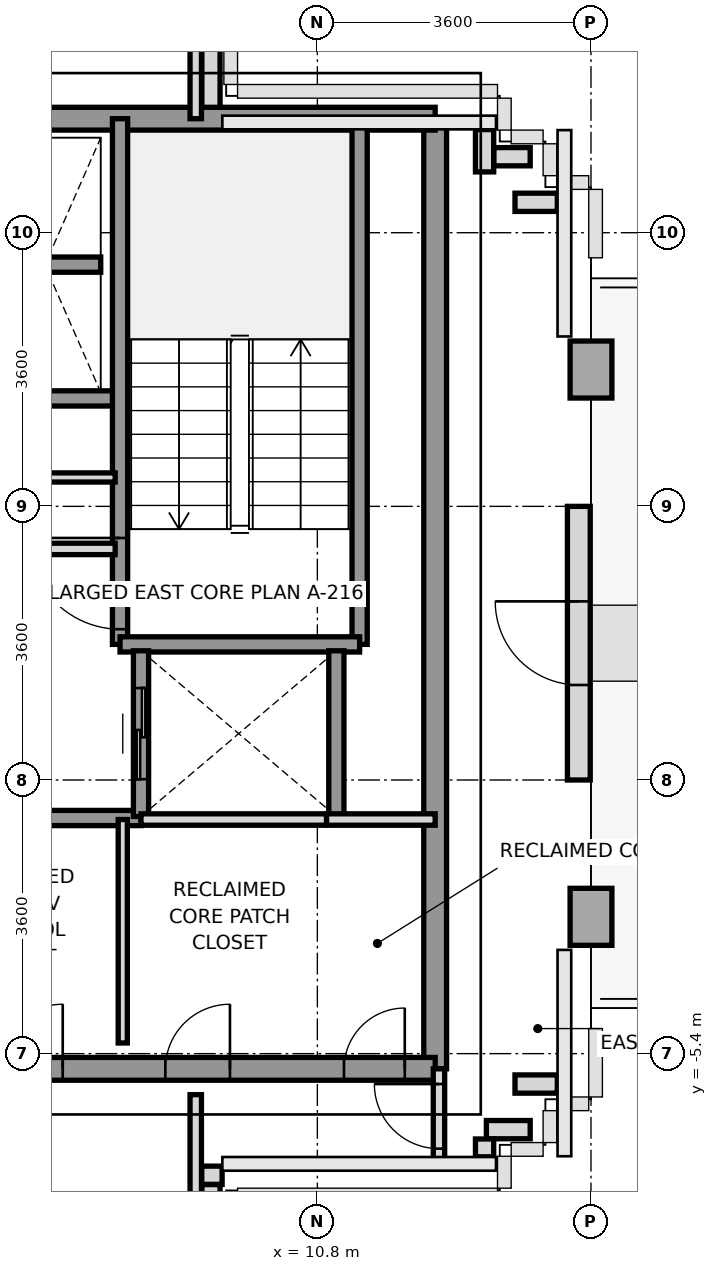
"""IFC4 building model, lengths in metres.
Left out: names, types, materials, properties, quantities, classifications, styles, units other than length and angle.
Written with IfcOpenShell. Run it as: python <this file> out.ifc"""

import sys

from ifc_helpers import new_model, si_unit, direction, frame, frame_2d, origin, origin_2d, place, context, subcontext, project, spatial, rectangle, extrude, source, transform, mapped, element, fill, save


model = new_model("IFC4")
c1 = context("Model", 3, precision=1e-05, world=origin(), true_north=direction((0.0, 1.0)))
c2 = subcontext(c1, "Body", "Model", "MODEL_VIEW")
j1 = project(units=[si_unit("LENGTHUNIT", "METRE"), si_unit("PLANEANGLEUNIT", "RADIAN")], contexts=[c1])
p1 = place(None, origin())
s1 = spatial("IfcSite", under=j1, at=p1, CompositionType="ELEMENT")
p2 = place(p1, origin())
s2 = spatial("IfcBuilding", under=s1, at=p2, CompositionType="ELEMENT")
p3 = place(p2, frame((0.0, 0.0, 258.8)))
s3 = spatial("IfcBuildingStorey", under=s2, at=p3, CompositionType="ELEMENT", Elevation=258.8)
m1 = source(origin(), c2, "Body", "SweptSolid", [
    extrude(rectangle(XDim=0.55, YDim=0.75, at=origin_2d()), origin(), (0.0, 0.0, 1.0), 3.01),
])
for number, where, z_axis, x_axis in (
    (1, (14.4, -3.6, 0.0), (0.0, 0.0, 1.0), (1.0, 0.0, 0.0)),
    (2, (14.4, 3.6, 0.0), (0.0, 0.0, 1.0), (1.0, 0.0, 0.0)),
):
    element("IfcColumn", number, at=place(p3, frame(where, z_axis=z_axis, x_axis=x_axis)), inside=s3, PredefinedType="COLUMN", context=c2, shape_type="MappedRepresentation", body=[
        mapped(m1, transform((0.0, 0.0, 0.0), x_axis=(1.0, 0.0, 0.0), y_axis=(0.0, 1.0, 0.0), z_axis=(0.0, 0.0, 1.0), scale=1.0)),
    ])
p4 = place(p3, frame((14.24, -1.8, 0.0), z_axis=(0.0, 0.0, 1.0), x_axis=(0.0, 1.0, 0.0)))
e3 = element("IfcWall", 3, at=p4, inside=s3, PredefinedType="SOLIDWALL", context=c2, shape_type="SweptSolid", body=[
    extrude(rectangle(XDim=3.6, YDim=0.3, at=frame_2d((1.8, 0.0))), origin(), (0.0, 0.0, 1.0), 2.36),
])
p5 = place(p4, frame((1.25, 0.0, 0.0)))
e4 = element("IfcOpeningElement", 4, at=p5, cuts=e3, PredefinedType="OPENING", context=c2, shape_type="SweptSolid", body=[
    extrude(rectangle(XDim=1.1, YDim=2.3, at=frame_2d((0.55, 1.15))), frame((0.0, 0.16, 0.0), z_axis=(0.0, -1.0, 0.0), x_axis=(1.0, 0.0, 0.0)), (0.0, 0.0, 1.0), 0.32),
])
p6 = place(p3, frame((13.957, -5.8, 0.0), z_axis=(0.0, 0.0, 1.0), x_axis=(-1.0, 0.0, 0.0)))
e5 = element("IfcWall", 5, at=p6, inside=s3, PredefinedType="PARAPET", context=c2, shape_type="SweptSolid", body=[
    extrude(rectangle(XDim=0.557, YDim=0.24, at=frame_2d((0.279, 0.0))), origin(), (0.0, 0.0, 1.0), 1.15),
])
p7 = place(p3, frame((13.6, -6.4, 0.0), z_axis=(0.0, 0.0, 1.0), x_axis=(-1.0, 0.0, 0.0)))
e6 = element("IfcWall", 6, at=p7, inside=s3, PredefinedType="PARAPET", context=c2, shape_type="SweptSolid", body=[
    extrude(rectangle(XDim=0.576, YDim=0.24, at=frame_2d((0.288, 0.0))), origin(), (0.0, 0.0, 1.0), 1.15),
])
p8 = place(p3, frame((13.0, -6.523, 0.0), z_axis=(0.0, 0.0, 1.0), x_axis=(0.0, -1.0, 0.0)))
e7 = element("IfcWall", 7, at=p8, inside=s3, PredefinedType="PARAPET", context=c2, shape_type="SweptSolid", body=[
    extrude(rectangle(XDim=0.234, YDim=0.24, at=frame_2d((0.117, 0.0))), origin(), (0.0, 0.0, 1.0), 1.15),
])
p9 = place(p3, frame((9.547, -7.0, 0.0), z_axis=(0.0, 0.0, 1.0), x_axis=(-1.0, 0.0, 0.0)))
e8 = element("IfcWall", 8, at=p9, inside=s3, PredefinedType="PARAPET", context=c2, shape_type="SweptSolid", body=[
    extrude(rectangle(XDim=0.269, YDim=0.24, at=frame_2d((0.135, 0.0))), origin(), (0.0, 0.0, 1.0), 1.15),
])
p10 = place(p3, frame((9.4, -7.123, 0.0), z_axis=(0.0, 0.0, 1.0), x_axis=(0.0, -1.0, 0.0)))
e9 = element("IfcWall", 9, at=p10, inside=s3, PredefinedType="PARAPET", context=c2, shape_type="SweptSolid", body=[
    extrude(rectangle(XDim=1.499, YDim=0.24, at=frame_2d((0.75, 0.0))), origin(), (0.0, 0.0, 1.0), 1.15),
])
p11 = place(p3, frame((9.4, 8.622, 0.0), z_axis=(0.0, 0.0, 1.0), x_axis=(0.0, -1.0, 0.0)))
e10 = element("IfcWall", 10, at=p11, inside=s3, PredefinedType="PARAPET", context=c2, shape_type="SweptSolid", body=[
    extrude(rectangle(XDim=1.669, YDim=0.24, at=frame_2d((0.834, 0.0))), origin(), (0.0, 0.0, 1.0), 1.15),
])
p12 = place(p3, frame((13.0, 6.757, 0.0), z_axis=(0.0, 0.0, 1.0), x_axis=(0.0, -1.0, 0.0)))
e11 = element("IfcWall", 11, at=p12, inside=s3, PredefinedType="PARAPET", context=c2, shape_type="SweptSolid", body=[
    extrude(rectangle(XDim=0.557, YDim=0.24, at=frame_2d((0.279, 0.0))), origin(), (0.0, 0.0, 1.0), 1.15),
])
p13 = place(p3, frame((13.123, 6.4, 0.0), z_axis=(0.0, 0.0, 1.0), x_axis=(1.0, 0.0, 0.0)))
e12 = element("IfcWall", 12, at=p13, inside=s3, PredefinedType="PARAPET", context=c2, shape_type="SweptSolid", body=[
    extrude(rectangle(XDim=0.477, YDim=0.24, at=frame_2d((0.239, 0.0))), origin(), (0.0, 0.0, 1.0), 1.15),
])
p14 = place(p3, frame((13.4, 5.8, 0.0), z_axis=(0.0, 0.0, 1.0), x_axis=(1.0, 0.0, 0.0)))
e13 = element("IfcWall", 13, at=p14, inside=s3, PredefinedType="PARAPET", context=c2, shape_type="SweptSolid", body=[
    extrude(rectangle(XDim=0.557, YDim=0.24, at=frame_2d((0.279, 0.0))), origin(), (0.0, 0.0, 1.0), 1.15),
])
p15 = place(p3, frame((12.35, -5.6, 0.0), z_axis=(0.0, 0.0, 1.0), x_axis=(0.0, 1.0, 0.0)))
e14 = element("IfcWall", 14, at=p15, inside=s3, PredefinedType="SHEAR", context=c2, shape_type="SweptSolid", body=[
    extrude(rectangle(XDim=12.5, YDim=0.3, at=frame_2d((6.25, 0.0))), origin(), (0.0, 0.0, 1.0), 3.01),
])
p16 = place(p3, frame((5.4, 6.9, 0.0), z_axis=(0.0, 0.0, 1.0), x_axis=(1.0, 0.0, 0.0)))
e15 = element("IfcWall", 15, at=p16, inside=s3, PredefinedType="SHEAR", context=c2, shape_type="SweptSolid", body=[
    extrude(rectangle(XDim=6.95, YDim=0.3, at=frame_2d((3.475, 0.0))), origin(), (0.0, 0.0, 1.0), 3.01),
])
p17 = place(p3, frame((5.4, -5.6, 0.0), z_axis=(0.0, 0.0, 1.0), x_axis=(1.0, 0.0, 0.0)))
e16 = element("IfcWall", 16, at=p17, inside=s3, PredefinedType="SHEAR", context=c2, shape_type="SweptSolid", body=[
    extrude(rectangle(XDim=6.95, YDim=0.3, at=frame_2d((3.475, 0.0))), origin(), (0.0, 0.0, 1.0), 3.01),
])
p18 = place(p17, frame((5.75, 0.0, 0.0)))
e17 = element("IfcOpeningElement", 17, at=p18, cuts=e16, PredefinedType="OPENING", context=c2, shape_type="SweptSolid", body=[
    extrude(rectangle(XDim=0.8, YDim=2.1, at=frame_2d((0.4, 1.05))), frame((0.0, 0.16, 0.0), z_axis=(0.0, -1.0, 0.0), x_axis=(1.0, 0.0, 0.0)), (0.0, 0.0, 1.0), 0.32),
])
p19 = place(p17, frame((1.2, 0.0, 0.0)))
e18 = element("IfcOpeningElement", 18, at=p19, cuts=e16, PredefinedType="OPENING", context=c2, shape_type="SweptSolid", body=[
    extrude(rectangle(XDim=0.85, YDim=2.1, at=frame_2d((0.425, 1.05))), frame((0.0, 0.16, 0.0), z_axis=(0.0, -1.0, 0.0), x_axis=(1.0, 0.0, 0.0)), (0.0, 0.0, 1.0), 0.32),
])
p20 = place(p17, frame((3.4, 0.0, 0.0)))
e19 = element("IfcOpeningElement", 19, at=p20, cuts=e16, PredefinedType="OPENING", context=c2, shape_type="SweptSolid", body=[
    extrude(rectangle(XDim=0.85, YDim=2.1, at=frame_2d((0.425, 1.05))), frame((0.0, 0.16, 0.0), z_axis=(0.0, -1.0, 0.0), x_axis=(1.0, 0.0, 0.0)), (0.0, 0.0, 1.0), 0.32),
])
p21 = place(p3, frame((5.4, 3.22, 0.0), z_axis=(0.0, 0.0, 1.0), x_axis=(1.0, 0.0, 0.0)))
e20 = element("IfcWall", 20, at=p21, inside=s3, PredefinedType="SOLIDWALL", context=c2, shape_type="SweptSolid", body=[
    extrude(rectangle(XDim=2.78, YDim=0.2, at=frame_2d((1.39, 0.0))), origin(), (0.0, 0.0, 1.0), 3.01),
])
p22 = place(p3, frame((5.4, -2.3, 0.0), z_axis=(0.0, 0.0, 1.0), x_axis=(1.0, 0.0, 0.0)))
e21 = element("IfcWall", 21, at=p22, inside=s3, PredefinedType="SOLIDWALL", context=c2, shape_type="SweptSolid", body=[
    extrude(rectangle(XDim=3.08, YDim=0.2, at=frame_2d((1.54, 0.0))), origin(), (0.0, 0.0, 1.0), 3.01),
])
p23 = place(p3, frame((8.204, -0.016, 0.0), z_axis=(0.0, 0.0, 1.0), x_axis=(0.0, 1.0, 0.0)))
e22 = element("IfcWall", 22, at=p23, inside=s3, PredefinedType="SOLIDWALL", context=c2, shape_type="SweptSolid", body=[
    extrude(rectangle(XDim=6.916, YDim=0.2, at=frame_2d((3.458, 0.0))), origin(), (0.0, 0.0, 1.0), 3.01),
])
p24 = place(p23, frame((0.2, 0.0, 0.0)))
e23 = element("IfcOpeningElement", 23, at=p24, cuts=e22, PredefinedType="OPENING", context=c2, shape_type="SweptSolid", body=[
    extrude(rectangle(XDim=1.2, YDim=2.2, at=frame_2d((0.6, 1.1))), frame((0.0, 0.11, 0.0), z_axis=(0.0, -1.0, 0.0), x_axis=(1.0, 0.0, 0.0)), (0.0, 0.0, 1.0), 0.22),
])
p25 = place(p3, frame((11.356, -0.016, 0.0), z_axis=(0.0, 0.0, 1.0), x_axis=(0.0, 1.0, 0.0)))
e24 = element("IfcWall", 24, at=p25, inside=s3, PredefinedType="SOLIDWALL", context=c2, shape_type="SweptSolid", body=[
    extrude(rectangle(XDim=6.916, YDim=0.2, at=frame_2d((3.458, 0.0))), origin(), (0.0, 0.0, 1.0), 3.01),
])
p26 = place(p3, frame((8.204, -0.016, 0.0), z_axis=(0.0, 0.0, 1.0), x_axis=(1.0, 0.0, 0.0)))
e25 = element("IfcWall", 25, at=p26, inside=s3, PredefinedType="SOLIDWALL", context=c2, shape_type="SweptSolid", body=[
    extrude(rectangle(XDim=3.152, YDim=0.2, at=frame_2d((1.576, 0.0))), origin(), (0.0, 0.0, 1.0), 3.01),
])
p27 = place(p3, frame((8.48, -2.28, 0.0), z_axis=(0.0, 0.0, 1.0), x_axis=(0.0, 1.0, 0.0)))
e26 = element("IfcWall", 26, at=p27, inside=s3, PredefinedType="SOLIDWALL", context=c2, shape_type="SweptSolid", body=[
    extrude(rectangle(XDim=2.18, YDim=0.2, at=frame_2d((1.09, 0.0))), origin(), (0.0, 0.0, 1.0), 3.01),
])
p28 = place(p27, frame((0.49, 0.0, 0.0)))
e27 = element("IfcOpeningElement", 27, at=p28, cuts=e26, PredefinedType="OPENING", context=c2, shape_type="SweptSolid", body=[
    extrude(rectangle(XDim=1.2, YDim=2.2, at=frame_2d((0.6, 1.1))), frame((0.0, 0.11, 0.0), z_axis=(0.0, -1.0, 0.0), x_axis=(1.0, 0.0, 0.0)), (0.0, 0.0, 1.0), 0.22),
])
p29 = place(p3, frame((11.05, -2.28, 0.0), z_axis=(0.0, 0.0, 1.0), x_axis=(0.0, 1.0, 0.0)))
e28 = element("IfcWall", 28, at=p29, inside=s3, PredefinedType="SOLIDWALL", context=c2, shape_type="SweptSolid", body=[
    extrude(rectangle(XDim=2.18, YDim=0.2, at=frame_2d((1.09, 0.0))), origin(), (0.0, 0.0, 1.0), 3.01),
])
p30 = place(p3, frame((6.48, 4.98, 0.0), z_axis=(0.0, 0.0, 1.0), x_axis=(1.0, 0.0, 0.0)))
e29 = element("IfcWall", 29, at=p30, inside=s3, PredefinedType="SOLIDWALL", context=c2, shape_type="SweptSolid", body=[
    extrude(rectangle(XDim=1.47, YDim=0.2, at=frame_2d((0.735, 0.0))), origin(), (0.0, 0.0, 1.0), 3.01),
])
p31 = place(p3, frame((5.75, 1.24, 0.0), z_axis=(0.0, 0.0, 1.0), x_axis=(1.0, 0.0, 0.0)))
e30 = element("IfcWall", 30, at=p31, inside=s3, PredefinedType="PARTITIONING", context=c2, shape_type="SweptSolid", body=[
    extrude(rectangle(XDim=2.39, YDim=0.15, at=frame_2d((1.195, 0.0))), origin(), (0.0, 0.0, 1.0), 3.01),
])
p32 = place(p3, frame((5.75, 2.18, 0.0), z_axis=(0.0, 0.0, 1.0), x_axis=(1.0, 0.0, 0.0)))
e31 = element("IfcWall", 31, at=p32, inside=s3, PredefinedType="PARTITIONING", context=c2, shape_type="SweptSolid", body=[
    extrude(rectangle(XDim=2.39, YDim=0.12, at=frame_2d((1.195, 0.0))), origin(), (0.0, 0.0, 1.0), 3.01),
])
p33 = place(p3, frame((10.92, -2.32, 0.0), z_axis=(0.0, 0.0, 1.0), x_axis=(1.0, 0.0, 0.0)))
e32 = element("IfcWall", 32, at=p33, inside=s3, PredefinedType="PARTITIONING", context=c2, shape_type="SweptSolid", body=[
    extrude(rectangle(XDim=1.43, YDim=0.15, at=frame_2d((0.715, 0.0))), origin(), (0.0, 0.0, 1.0), 3.01),
])
p34 = place(p3, frame((8.24, -5.26, 0.0), z_axis=(0.0, 0.0, 1.0), x_axis=(0.0, 1.0, 0.0)))
e33 = element("IfcWall", 33, at=p34, inside=s3, PredefinedType="PARTITIONING", context=c2, shape_type="SweptSolid", body=[
    extrude(rectangle(XDim=2.94, YDim=0.12, at=frame_2d((1.47, 0.0))), origin(), (0.0, 0.0, 1.0), 3.01),
])
p35 = place(p3, frame((8.48, -2.32, 0.0), z_axis=(0.0, 0.0, 1.0), x_axis=(1.0, 0.0, 0.0)))
e34 = element("IfcWall", 34, at=p35, inside=s3, PredefinedType="PARTITIONING", context=c2, shape_type="SweptSolid", body=[
    extrude(rectangle(XDim=2.44, YDim=0.15, at=frame_2d((1.22, 0.0))), origin(), (0.0, 0.0, 1.0), 3.01),
])
p36 = place(p3, frame((9.2, 6.9, 0.0), z_axis=(0.0, 0.0, 1.0), x_axis=(0.0, 1.0, 0.0)))
e35 = element("IfcWall", 35, at=p36, inside=s3, PredefinedType="PARTITIONING", context=c2, shape_type="SweptSolid", body=[
    extrude(rectangle(XDim=3.38, YDim=0.15, at=frame_2d((1.69, 0.0))), origin(), (0.0, 0.0, 1.0), 2.61),
])
p37 = place(p3, frame((9.2, -10.28, 0.0), z_axis=(0.0, 0.0, 1.0), x_axis=(0.0, 1.0, 0.0)))
e36 = element("IfcWall", 36, at=p37, inside=s3, PredefinedType="PARTITIONING", context=c2, shape_type="SweptSolid", body=[
    extrude(rectangle(XDim=4.34, YDim=0.15, at=frame_2d((2.17, 0.0))), origin(), (0.0, 0.0, 1.0), 2.61),
])
p38 = place(p3, frame((12.4, -6.85, 0.0), z_axis=(0.0, 0.0, 1.0), x_axis=(0.0, 1.0, 0.0)))
e37 = element("IfcWall", 37, at=p38, inside=s3, PredefinedType="PARTITIONING", context=c2, shape_type="SweptSolid", body=[
    extrude(rectangle(XDim=1.25, YDim=0.15, at=frame_2d((0.625, 0.0))), origin(), (0.0, 0.0, 1.0), 3.01),
])
p39 = place(p38, frame((0.2, 0.0, 0.0)))
e38 = element("IfcOpeningElement", 38, at=p39, cuts=e37, PredefinedType="OPENING", context=c2, shape_type="SweptSolid", body=[
    extrude(rectangle(XDim=0.85, YDim=2.1, at=frame_2d((0.425, 1.05))), frame((0.0, 0.085, 0.0), z_axis=(0.0, -1.0, 0.0), x_axis=(1.0, 0.0, 0.0)), (0.0, 0.0, 1.0), 0.17),
])
m2 = source(origin(), c2, "Body", "SweptSolid", [
    extrude(rectangle(XDim=1.1, YDim=2.3, at=frame_2d((0.55, 1.15))), frame((0.0, 0.025, 0.0), z_axis=(0.0, -1.0, 0.0), x_axis=(1.0, 0.0, 0.0)), (0.0, 0.0, 1.0), 0.05),
])
p40 = place(p5, frame((1.1, 0.0, 0.0), z_axis=(0.0, 0.0, 1.0), x_axis=(-1.0, 0.0, 0.0)))
e39 = element("IfcDoor", 39, at=p40, inside=s3, OperationType="SINGLE_SWING_RIGHT", PredefinedType="DOOR", context=c2, shape_type="MappedRepresentation", body=[
    mapped(m2, transform((0.0, 0.0, 0.0), x_axis=(1.0, 0.0, 0.0), y_axis=(0.0, 1.0, 0.0), z_axis=(0.0, 0.0, 1.0), scale=1.0)),
])
fill(e4, e39)
m3 = source(origin(), c2, "Body", "SweptSolid", [
    extrude(rectangle(XDim=1.2, YDim=2.2, at=frame_2d((0.6, 1.1))), frame((0.0, 0.025, 0.0), z_axis=(0.0, -1.0, 0.0), x_axis=(1.0, 0.0, 0.0)), (0.0, 0.0, 1.0), 0.05),
])
p41 = place(p24, origin())
e40 = element("IfcDoor", 40, at=p41, inside=s3, OperationType="SINGLE_SWING_RIGHT", PredefinedType="DOOR", context=c2, shape_type="MappedRepresentation", body=[
    mapped(m3, transform((0.0, 0.0, 0.0), x_axis=(1.0, 0.0, 0.0), y_axis=(0.0, 1.0, 0.0), z_axis=(0.0, 0.0, 1.0), scale=1.0)),
])
fill(e23, e40)
m4 = source(origin(), c2, "Body", "SweptSolid", [
    extrude(rectangle(XDim=0.8, YDim=2.1, at=frame_2d((0.4, 1.05))), frame((0.0, 0.025, 0.0), z_axis=(0.0, -1.0, 0.0), x_axis=(1.0, 0.0, 0.0)), (0.0, 0.0, 1.0), 0.05),
])
p42 = place(p18, origin())
e41 = element("IfcDoor", 41, at=p42, inside=s3, OperationType="SINGLE_SWING_RIGHT", PredefinedType="DOOR", context=c2, shape_type="MappedRepresentation", body=[
    mapped(m4, transform((0.0, 0.0, 0.0), x_axis=(1.0, 0.0, 0.0), y_axis=(0.0, 1.0, 0.0), z_axis=(0.0, 0.0, 1.0), scale=1.0)),
])
fill(e17, e41)
m5 = source(origin(), c2, "Body", "SweptSolid", [
    extrude(rectangle(XDim=0.85, YDim=2.1, at=frame_2d((0.425, 1.05))), frame((0.0, 0.025, 0.0), z_axis=(0.0, -1.0, 0.0), x_axis=(1.0, 0.0, 0.0)), (0.0, 0.0, 1.0), 0.05),
])
p43 = place(p19, origin())
e42 = element("IfcDoor", 42, at=p43, inside=s3, OperationType="SINGLE_SWING_RIGHT", PredefinedType="DOOR", context=c2, shape_type="MappedRepresentation", body=[
    mapped(m5, transform((0.0, 0.0, 0.0), x_axis=(1.0, 0.0, 0.0), y_axis=(0.0, 1.0, 0.0), z_axis=(0.0, 0.0, 1.0), scale=1.0)),
])
fill(e18, e42)
p44 = place(p20, origin())
e43 = element("IfcDoor", 43, at=p44, inside=s3, OperationType="SINGLE_SWING_RIGHT", PredefinedType="DOOR", context=c2, shape_type="MappedRepresentation", body=[
    mapped(m5, transform((0.0, 0.0, 0.0), x_axis=(1.0, 0.0, 0.0), y_axis=(0.0, 1.0, 0.0), z_axis=(0.0, 0.0, 1.0), scale=1.0)),
])
fill(e19, e43)
p45 = place(p28, origin())
e44 = element("IfcDoor", 44, at=p45, inside=s3, OperationType="SLIDING_TO_RIGHT", PredefinedType="DOOR", context=c2, shape_type="MappedRepresentation", body=[
    mapped(m3, transform((0.0, 0.0, 0.0), x_axis=(1.0, 0.0, 0.0), y_axis=(0.0, 1.0, 0.0), z_axis=(0.0, 0.0, 1.0), scale=1.0)),
])
fill(e27, e44)
p46 = place(p39, origin())
e45 = element("IfcDoor", 45, at=p46, inside=s3, OperationType="SINGLE_SWING_RIGHT", PredefinedType="DOOR", context=c2, shape_type="MappedRepresentation", body=[
    mapped(m5, transform((0.0, 0.0, 0.0), x_axis=(1.0, 0.0, 0.0), y_axis=(0.0, 1.0, 0.0), z_axis=(0.0, 0.0, 1.0), scale=1.0)),
])
fill(e38, e45)
save(model, sys.argv[1])
